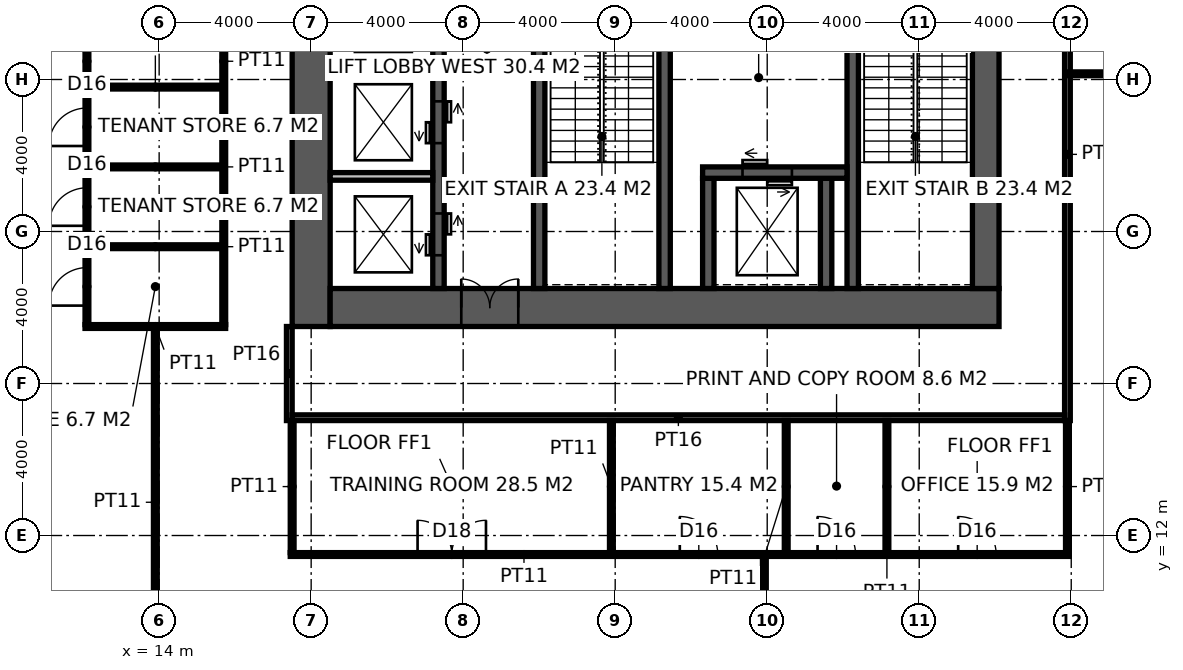
"""IFC4 building model, lengths in metres.
Left out: names, types, materials, properties, quantities, classifications, styles, units other than length and angle.
Written with IfcOpenShell. Run it as: python <this file> out.ifc"""

import sys

from ifc_helpers import new_model, si_unit, direction, frame, frame_2d, origin, place, context, subcontext, project, spatial, rectangle, extrude, element, fill, save


model = new_model("IFC4")
c1 = context("Model", 3, precision=1e-05, world=origin(), true_north=direction((0.0, 1.0)))
c2 = subcontext(c1, "Body", "Model", "MODEL_VIEW")
j1 = project(units=[si_unit("LENGTHUNIT", "METRE"), si_unit("PLANEANGLEUNIT", "RADIAN")], contexts=[c1])
p1 = place(None, origin())
s1 = spatial("IfcSite", under=j1, at=p1, CompositionType="ELEMENT")
p2 = place(p1, origin())
s2 = spatial("IfcBuilding", under=s1, at=p2, CompositionType="ELEMENT")
p3 = place(p2, frame((0.0, 0.0, 187.8)))
s3 = spatial("IfcBuildingStorey", under=s2, at=p3, CompositionType="ELEMENT", Elevation=187.8)
p4 = place(p3, frame((18.0, 17.5, -0.15), z_axis=(0.0, 0.0, 1.0), x_axis=(0.0, 1.0, 0.0)))
e1 = element("IfcWall", 1, at=p4, inside=s3, PredefinedType="SHEAR", context=c2, shape_type="SweptSolid", body=[
    extrude(rectangle(XDim=19.0, YDim=1.0, at=frame_2d((9.5, 0.0))), origin(), (0.0, 0.0, 1.0), 4.0),
])
p5 = place(p3, frame((18.5, 18.0, -0.15), z_axis=(0.0, 0.0, 1.0), x_axis=(1.0, 0.0, 0.0)))
e2 = element("IfcWall", 2, at=p5, inside=s3, PredefinedType="SHEAR", context=c2, shape_type="SweptSolid", body=[
    extrude(rectangle(XDim=17.6, YDim=1.0, at=frame_2d((8.8, 0.0))), origin(), (0.0, 0.0, 1.0), 4.0),
])
p6 = place(p5, frame((3.45, 0.0, 0.15)))
e3 = element("IfcOpeningElement", 3, at=p6, cuts=e2, PredefinedType="OPENING", context=c2, shape_type="SweptSolid", body=[
    extrude(rectangle(XDim=1.5, YDim=2.4, at=frame_2d((0.75, 1.2))), frame((0.0, 0.51, 0.0), z_axis=(0.0, -1.0, 0.0), x_axis=(1.0, 0.0, 0.0)), (0.0, 0.0, 1.0), 1.02),
])
p7 = place(p3, frame((35.75, 18.5, -0.15), z_axis=(0.0, 0.0, 1.0), x_axis=(0.0, 1.0, 0.0)))
e4 = element("IfcWall", 4, at=p7, inside=s3, PredefinedType="SHEAR", context=c2, shape_type="SweptSolid", body=[
    extrude(rectangle(XDim=17.0, YDim=0.7, at=frame_2d((8.5, 0.0))), origin(), (0.0, 0.0, 1.0), 4.0),
])
p8 = place(p7, frame((9.85, 0.0, 0.15)))
e5 = element("IfcOpeningElement", 5, at=p8, cuts=e4, PredefinedType="OPENING", context=c2, shape_type="SweptSolid", body=[
    extrude(rectangle(XDim=1.0, YDim=2.2, at=frame_2d((0.5, 1.1))), frame((0.0, 0.36, 0.0), z_axis=(0.0, -1.0, 0.0), x_axis=(1.0, 0.0, 0.0)), (0.0, 0.0, 1.0), 0.72),
])
p9 = place(p3, frame((24.0, 18.5, -0.15), z_axis=(0.0, 0.0, 1.0), x_axis=(0.0, 1.0, 0.0)))
e6 = element("IfcWall", 6, at=p9, inside=s3, PredefinedType="SHEAR", context=c2, shape_type="SweptSolid", body=[
    extrude(rectangle(XDim=17.0, YDim=0.3, at=frame_2d((8.5, 0.0))), origin(), (0.0, 0.0, 1.0), 4.0),
])
p10 = place(p9, frame((9.6, 0.0, 0.15)))
e7 = element("IfcOpeningElement", 7, at=p10, cuts=e6, PredefinedType="OPENING", context=c2, shape_type="SweptSolid", body=[
    extrude(rectangle(XDim=1.5, YDim=2.4, at=frame_2d((0.75, 1.2))), frame((0.0, 0.16, 0.0), z_axis=(0.0, -1.0, 0.0), x_axis=(1.0, 0.0, 0.0)), (0.0, 0.0, 1.0), 0.32),
])
p11 = place(p3, frame((27.3, 18.5, -0.15), z_axis=(0.0, 0.0, 1.0), x_axis=(0.0, 1.0, 0.0)))
e8 = element("IfcWall", 8, at=p11, inside=s3, PredefinedType="SHEAR", context=c2, shape_type="SweptSolid", body=[
    extrude(rectangle(XDim=7.9, YDim=0.3, at=frame_2d((3.95, 0.0))), origin(), (0.0, 0.0, 1.0), 4.0),
])
p12 = place(p11, frame((6.4, 0.0, 0.15)))
e9 = element("IfcOpeningElement", 9, at=p12, cuts=e8, PredefinedType="OPENING", context=c2, shape_type="SweptSolid", body=[
    extrude(rectangle(XDim=1.0, YDim=2.2, at=frame_2d((0.5, 1.1))), frame((0.0, 0.16, 0.0), z_axis=(0.0, -1.0, 0.0), x_axis=(1.0, 0.0, 0.0)), (0.0, 0.0, 1.0), 0.32),
])
p13 = place(p3, frame((32.25, 18.5, -0.15), z_axis=(0.0, 0.0, 1.0), x_axis=(0.0, 1.0, 0.0)))
e10 = element("IfcWall", 10, at=p13, inside=s3, PredefinedType="SHEAR", context=c2, shape_type="SweptSolid", body=[
    extrude(rectangle(XDim=7.9, YDim=0.3, at=frame_2d((3.95, 0.0))), origin(), (0.0, 0.0, 1.0), 4.0),
])
for number, where, z_axis, x_axis in (
    (11, (28.45, 18.5, -0.15), (0.0, 0.0, 1.0), (0.0, 1.0, 0.0)),
    (12, (31.55, 18.5, -0.15), (0.0, 0.0, 1.0), (0.0, 1.0, 0.0)),
):
    element("IfcWall", number, at=place(p3, frame(where, z_axis=z_axis, x_axis=x_axis)), inside=s3, PredefinedType="SHEAR", context=c2, shape_type="SweptSolid", body=[
        extrude(rectangle(XDim=2.9, YDim=0.3, at=frame_2d((1.45, 0.0))), origin(), (0.0, 0.0, 1.0), 4.0),
    ])
p14 = place(p3, frame((28.3, 21.55, -0.15), z_axis=(0.0, 0.0, 1.0), x_axis=(1.0, 0.0, 0.0)))
e13 = element("IfcWall", 13, at=p14, inside=s3, PredefinedType="SHEAR", context=c2, shape_type="SweptSolid", body=[
    extrude(rectangle(XDim=3.8, YDim=0.3, at=frame_2d((1.9, 0.0))), origin(), (0.0, 0.0, 1.0), 4.0),
])
p15 = place(p14, frame((1.05, 0.0, 0.15)))
e14 = element("IfcOpeningElement", 14, at=p15, cuts=e13, PredefinedType="OPENING", context=c2, shape_type="SweptSolid", body=[
    extrude(rectangle(XDim=1.3, YDim=2.4, at=frame_2d((0.65, 1.2))), frame((0.0, 0.16, 0.0), z_axis=(0.0, -1.0, 0.0), x_axis=(1.0, 0.0, 0.0)), (0.0, 0.0, 1.0), 0.32),
])
p16 = place(p3, frame((21.35, 18.5, -0.15), z_axis=(0.0, 0.0, 1.0), x_axis=(0.0, 1.0, 0.0)))
e15 = element("IfcWall", 15, at=p16, inside=s3, PredefinedType="SHEAR", context=c2, shape_type="SweptSolid", body=[
    extrude(rectangle(XDim=12.5, YDim=0.3, at=frame_2d((6.25, 0.0))), origin(), (0.0, 0.0, 1.0), 4.0),
])
p17 = place(p16, frame((0.875, 0.0, 0.15)))
e16 = element("IfcOpeningElement", 16, at=p17, cuts=e15, PredefinedType="OPENING", context=c2, shape_type="SweptSolid", body=[
    extrude(rectangle(XDim=1.1, YDim=2.2, at=frame_2d((0.55, 1.1))), frame((0.0, 0.16, 0.0), z_axis=(0.0, -1.0, 0.0), x_axis=(1.0, 0.0, 0.0)), (0.0, 0.0, 1.0), 0.32),
])
p18 = place(p16, frame((3.825, 0.0, 0.15)))
e17 = element("IfcOpeningElement", 17, at=p18, cuts=e15, PredefinedType="OPENING", context=c2, shape_type="SweptSolid", body=[
    extrude(rectangle(XDim=1.1, YDim=2.2, at=frame_2d((0.55, 1.1))), frame((0.0, 0.16, 0.0), z_axis=(0.0, -1.0, 0.0), x_axis=(1.0, 0.0, 0.0)), (0.0, 0.0, 1.0), 0.32),
])
p19 = place(p16, frame((6.675, 0.0, 0.15)))
e18 = element("IfcOpeningElement", 18, at=p19, cuts=e15, PredefinedType="OPENING", context=c2, shape_type="SweptSolid", body=[
    extrude(rectangle(XDim=1.1, YDim=2.2, at=frame_2d((0.55, 1.1))), frame((0.0, 0.16, 0.0), z_axis=(0.0, -1.0, 0.0), x_axis=(1.0, 0.0, 0.0)), (0.0, 0.0, 1.0), 0.32),
])
p20 = place(p16, frame((9.575, 0.0, 0.15)))
e19 = element("IfcOpeningElement", 19, at=p20, cuts=e15, PredefinedType="OPENING", context=c2, shape_type="SweptSolid", body=[
    extrude(rectangle(XDim=1.1, YDim=2.2, at=frame_2d((0.55, 1.1))), frame((0.0, 0.16, 0.0), z_axis=(0.0, -1.0, 0.0), x_axis=(1.0, 0.0, 0.0)), (0.0, 0.0, 1.0), 0.32),
])
for number, where, z_axis, x_axis in (
    (20, (18.5, 21.45, -0.15), (0.0, 0.0, 1.0), (1.0, 0.0, 0.0)),
    (21, (18.5, 24.3, -0.15), (0.0, 0.0, 1.0), (1.0, 0.0, 0.0)),
):
    element("IfcWall", number, at=place(p3, frame(where, z_axis=z_axis, x_axis=x_axis)), inside=s3, PredefinedType="SOLIDWALL", context=c2, shape_type="SweptSolid", body=[
        extrude(rectangle(XDim=2.7, YDim=0.2, at=frame_2d((1.35, 0.0))), origin(), (0.0, 0.0, 1.0), 4.0),
    ])
p21 = place(p3, frame((17.425, 15.025, 0.0), z_axis=(0.0, 0.0, 1.0), x_axis=(0.0, 1.0, 0.0)))
e22 = element("IfcWall", 22, at=p21, inside=s3, PredefinedType="PARTITIONING", context=c2, shape_type="SweptSolid", body=[
    extrude(rectangle(XDim=2.475, YDim=0.15, at=frame_2d((1.238, 0.0))), origin(), (0.0, 0.0, 1.0), 3.85),
])
p22 = place(p3, frame((37.9, 15.025, 0.0), z_axis=(0.0, 0.0, 1.0), x_axis=(0.0, 1.0, 0.0)))
e23 = element("IfcWall", 23, at=p22, inside=s3, PredefinedType="PARTITIONING", context=c2, shape_type="SweptSolid", body=[
    extrude(rectangle(XDim=23.35, YDim=0.15, at=frame_2d((11.675, 0.0))), origin(), (0.0, 0.0, 1.0), 2.95),
])
p23 = place(p22, frame((10.775, 0.0, 0.0)))
e24 = element("IfcOpeningElement", 24, at=p23, cuts=e23, PredefinedType="OPENING", context=c2, shape_type="SweptSolid", body=[
    extrude(rectangle(XDim=1.8, YDim=2.4, at=frame_2d((0.9, 1.2))), frame((0.0, 0.085, 0.0), z_axis=(0.0, -1.0, 0.0), x_axis=(1.0, 0.0, 0.0)), (0.0, 0.0, 1.0), 0.17),
])
p24 = place(p3, frame((17.5, 15.1, 0.0), z_axis=(0.0, 0.0, 1.0), x_axis=(1.0, 0.0, 0.0)))
e25 = element("IfcWall", 25, at=p24, inside=s3, PredefinedType="PARTITIONING", context=c2, shape_type="SweptSolid", body=[
    extrude(rectangle(XDim=20.325, YDim=0.15, at=frame_2d((10.163, 0.0))), origin(), (0.0, 0.0, 1.0), 3.85),
])
p25 = place(p3, frame((17.45, 11.5, 0.0), z_axis=(0.0, 0.0, 1.0), x_axis=(1.0, 0.0, 0.0)))
e26 = element("IfcWall", 26, at=p25, inside=s3, PredefinedType="PARTITIONING", context=c2, shape_type="SweptSolid", body=[
    extrude(rectangle(XDim=20.5, YDim=0.1, at=frame_2d((10.25, 0.0))), origin(), (0.0, 0.0, 1.0), 3.85),
])
p26 = place(p25, frame((3.35, 0.0, 0.0)))
e27 = element("IfcOpeningElement", 27, at=p26, cuts=e26, PredefinedType="OPENING", context=c2, shape_type="SweptSolid", body=[
    extrude(rectangle(XDim=1.8, YDim=2.4, at=frame_2d((0.9, 1.2))), frame((0.0, 0.06, 0.0), z_axis=(0.0, -1.0, 0.0), x_axis=(1.0, 0.0, 0.0)), (0.0, 0.0, 1.0), 0.12),
])
p27 = place(p25, frame((10.25, 0.0, 0.0)))
e28 = element("IfcOpeningElement", 28, at=p27, cuts=e26, PredefinedType="OPENING", context=c2, shape_type="SweptSolid", body=[
    extrude(rectangle(XDim=1.0, YDim=2.2, at=frame_2d((0.5, 1.1))), frame((0.0, 0.06, 0.0), z_axis=(0.0, -1.0, 0.0), x_axis=(1.0, 0.0, 0.0)), (0.0, 0.0, 1.0), 0.12),
])
p28 = place(p25, frame((13.875, 0.0, 0.0)))
e29 = element("IfcOpeningElement", 29, at=p28, cuts=e26, PredefinedType="OPENING", context=c2, shape_type="SweptSolid", body=[
    extrude(rectangle(XDim=1.0, YDim=2.2, at=frame_2d((0.5, 1.1))), frame((0.0, 0.06, 0.0), z_axis=(0.0, -1.0, 0.0), x_axis=(1.0, 0.0, 0.0)), (0.0, 0.0, 1.0), 0.12),
])
p29 = place(p25, frame((17.575, 0.0, 0.0)))
e30 = element("IfcOpeningElement", 30, at=p29, cuts=e26, PredefinedType="OPENING", context=c2, shape_type="SweptSolid", body=[
    extrude(rectangle(XDim=1.0, YDim=2.2, at=frame_2d((0.5, 1.1))), frame((0.0, 0.06, 0.0), z_axis=(0.0, -1.0, 0.0), x_axis=(1.0, 0.0, 0.0)), (0.0, 0.0, 1.0), 0.12),
])
p30 = place(p3, frame((12.05, 17.5, 0.0), z_axis=(0.0, 0.0, 1.0), x_axis=(1.0, 0.0, 0.0)))
e31 = element("IfcWall", 31, at=p30, inside=s3, PredefinedType="PARTITIONING", context=c2, shape_type="SweptSolid", body=[
    extrude(rectangle(XDim=3.7, YDim=0.1, at=frame_2d((1.85, 0.0))), origin(), (0.0, 0.0, 1.0), 3.85),
])
p31 = place(p3, frame((12.15, 19.6, 0.0), z_axis=(0.0, 0.0, 1.0), x_axis=(1.0, 0.0, 0.0)))
e32 = element("IfcWall", 32, at=p31, inside=s3, PredefinedType="PARTITIONING", context=c2, shape_type="SweptSolid", body=[
    extrude(rectangle(XDim=3.5, YDim=0.1, at=frame_2d((1.75, 0.0))), origin(), (0.0, 0.0, 1.0), 2.85),
])
p32 = place(p3, frame((12.15, 21.7, 0.0), z_axis=(0.0, 0.0, 1.0), x_axis=(1.0, 0.0, 0.0)))
e33 = element("IfcWall", 33, at=p32, inside=s3, PredefinedType="PARTITIONING", context=c2, shape_type="SweptSolid", body=[
    extrude(rectangle(XDim=3.5, YDim=0.1, at=frame_2d((1.75, 0.0))), origin(), (0.0, 0.0, 1.0), 3.85),
])
p33 = place(p3, frame((12.15, 23.8, 0.0), z_axis=(0.0, 0.0, 1.0), x_axis=(1.0, 0.0, 0.0)))
e34 = element("IfcWall", 34, at=p33, inside=s3, PredefinedType="PARTITIONING", context=c2, shape_type="SweptSolid", body=[
    extrude(rectangle(XDim=3.5, YDim=0.1, at=frame_2d((1.75, 0.0))), origin(), (0.0, 0.0, 1.0), 2.95),
])
p34 = place(p3, frame((12.1, 17.55, 0.0), z_axis=(0.0, 0.0, 1.0), x_axis=(0.0, 1.0, 0.0)))
e35 = element("IfcWall", 35, at=p34, inside=s3, PredefinedType="PARTITIONING", context=c2, shape_type="SweptSolid", body=[
    extrude(rectangle(XDim=9.9, YDim=0.1, at=frame_2d((4.95, 0.0))), origin(), (0.0, 0.0, 1.0), 3.85),
])
p35 = place(p34, frame((0.5, 0.0, 0.0)))
e36 = element("IfcOpeningElement", 36, at=p35, cuts=e35, PredefinedType="OPENING", context=c2, shape_type="SweptSolid", body=[
    extrude(rectangle(XDim=1.0, YDim=2.2, at=frame_2d((0.5, 1.1))), frame((0.0, 0.06, 0.0), z_axis=(0.0, -1.0, 0.0), x_axis=(1.0, 0.0, 0.0)), (0.0, 0.0, 1.0), 0.12),
])
p36 = place(p34, frame((2.6, 0.0, 0.0)))
e37 = element("IfcOpeningElement", 37, at=p36, cuts=e35, PredefinedType="OPENING", context=c2, shape_type="SweptSolid", body=[
    extrude(rectangle(XDim=1.0, YDim=2.2, at=frame_2d((0.5, 1.1))), frame((0.0, 0.06, 0.0), z_axis=(0.0, -1.0, 0.0), x_axis=(1.0, 0.0, 0.0)), (0.0, 0.0, 1.0), 0.12),
])
p37 = place(p34, frame((4.7, 0.0, 0.0)))
e38 = element("IfcOpeningElement", 38, at=p37, cuts=e35, PredefinedType="OPENING", context=c2, shape_type="SweptSolid", body=[
    extrude(rectangle(XDim=1.0, YDim=2.2, at=frame_2d((0.5, 1.1))), frame((0.0, 0.06, 0.0), z_axis=(0.0, -1.0, 0.0), x_axis=(1.0, 0.0, 0.0)), (0.0, 0.0, 1.0), 0.12),
])
p38 = place(p34, frame((7.6, 0.0, 0.0)))
e39 = element("IfcOpeningElement", 39, at=p38, cuts=e35, PredefinedType="OPENING", context=c2, shape_type="SweptSolid", body=[
    extrude(rectangle(XDim=1.0, YDim=2.2, at=frame_2d((0.5, 1.1))), frame((0.0, 0.06, 0.0), z_axis=(0.0, -1.0, 0.0), x_axis=(1.0, 0.0, 0.0)), (0.0, 0.0, 1.0), 0.12),
])
p39 = place(p3, frame((15.7, 17.55, 0.0), z_axis=(0.0, 0.0, 1.0), x_axis=(0.0, 1.0, 0.0)))
e40 = element("IfcWall", 40, at=p39, inside=s3, PredefinedType="PARTITIONING", context=c2, shape_type="SweptSolid", body=[
    extrude(rectangle(XDim=9.9, YDim=0.1, at=frame_2d((4.95, 0.0))), origin(), (0.0, 0.0, 1.0), 3.85),
])
p40 = place(p3, frame((17.5, 11.55, 0.0), z_axis=(0.0, 0.0, 1.0), x_axis=(0.0, 1.0, 0.0)))
e41 = element("IfcWall", 41, at=p40, inside=s3, PredefinedType="PARTITIONING", context=c2, shape_type="SweptSolid", body=[
    extrude(rectangle(XDim=3.475, YDim=0.1, at=frame_2d((1.737, 0.0))), origin(), (0.0, 0.0, 1.0), 3.85),
])
p41 = place(p3, frame((25.9, 11.55, 0.0), z_axis=(0.0, 0.0, 1.0), x_axis=(0.0, 1.0, 0.0)))
e42 = element("IfcWall", 42, at=p41, inside=s3, PredefinedType="PARTITIONING", context=c2, shape_type="SweptSolid", body=[
    extrude(rectangle(XDim=3.475, YDim=0.1, at=frame_2d((1.737, 0.0))), origin(), (0.0, 0.0, 1.0), 2.95),
])
for number, where, z_axis, x_axis in (
    (43, (30.5, 11.55, 0.0), (0.0, 0.0, 1.0), (0.0, 1.0, 0.0)),
    (44, (33.15, 11.55, 0.0), (0.0, 0.0, 1.0), (0.0, 1.0, 0.0)),
):
    element("IfcWall", number, at=place(p3, frame(where, z_axis=z_axis, x_axis=x_axis)), inside=s3, PredefinedType="PARTITIONING", context=c2, shape_type="SweptSolid", body=[
        extrude(rectangle(XDim=3.475, YDim=0.1, at=frame_2d((1.737, 0.0))), origin(), (0.0, 0.0, 1.0), 3.85),
    ])
p42 = place(p3, frame((37.9, 11.55, 0.0), z_axis=(0.0, 0.0, 1.0), x_axis=(0.0, 1.0, 0.0)))
e45 = element("IfcWall", 45, at=p42, inside=s3, PredefinedType="PARTITIONING", context=c2, shape_type="SweptSolid", body=[
    extrude(rectangle(XDim=3.475, YDim=0.1, at=frame_2d((1.737, 0.0))), origin(), (0.0, 0.0, 1.0), 2.95),
])
p43 = place(p3, frame((29.925, 11.45, 0.0), z_axis=(0.0, 0.0, 1.0), x_axis=(0.0, -1.0, 0.0)))
e46 = element("IfcWall", 46, at=p43, inside=s3, PredefinedType="PARTITIONING", context=c2, shape_type="SweptSolid", body=[
    extrude(rectangle(XDim=3.15, YDim=0.1, at=frame_2d((1.575, 0.0))), origin(), (0.0, 0.0, 1.0), 2.95),
])
p44 = place(p3, frame((13.9, 8.3, 0.0), z_axis=(0.0, 0.0, 1.0), x_axis=(0.0, 1.0, 0.0)))
e47 = element("IfcWall", 47, at=p44, inside=s3, PredefinedType="PARTITIONING", context=c2, shape_type="SweptSolid", body=[
    extrude(rectangle(XDim=9.15, YDim=0.1, at=frame_2d((4.575, 0.0))), origin(), (0.0, 0.0, 1.0), 2.95),
])
p45 = place(p3, frame((37.9, 24.15, 0.0), z_axis=(0.0, 0.0, 1.0), x_axis=(1.0, 0.0, 0.0)))
e48 = element("IfcWall", 48, at=p45, inside=s3, PredefinedType="PARTITIONING", context=c2, shape_type="SweptSolid", body=[
    extrude(rectangle(XDim=4.5, YDim=0.1, at=frame_2d((2.25, 0.0))), origin(), (0.0, 0.0, 1.0), 2.95),
])
p46 = place(p6, origin())
e49 = element("IfcDoor", 49, at=p46, inside=s3, OperationType="DOUBLE_DOOR_DOUBLE_SWING", PredefinedType="DOOR", context=c2, shape_type="SweptSolid", body=[
    extrude(rectangle(XDim=1.5, YDim=2.4, at=frame_2d((0.75, 1.2))), frame((0.0, 0.025, 0.0), z_axis=(0.0, -1.0, 0.0), x_axis=(1.0, 0.0, 0.0)), (0.0, 0.0, 1.0), 0.05),
])
fill(e3, e49)
p47 = place(p26, origin())
e50 = element("IfcDoor", 50, at=p47, inside=s3, OperationType="DOUBLE_DOOR_DOUBLE_SWING", PredefinedType="DOOR", context=c2, shape_type="SweptSolid", body=[
    extrude(rectangle(XDim=1.8, YDim=2.4, at=frame_2d((0.9, 1.2))), frame((0.0, 0.025, 0.0), z_axis=(0.0, -1.0, 0.0), x_axis=(1.0, 0.0, 0.0)), (0.0, 0.0, 1.0), 0.05),
])
fill(e27, e50)
p48 = place(p27, origin())
e51 = element("IfcDoor", 51, at=p48, inside=s3, OperationType="SINGLE_SWING_LEFT", PredefinedType="DOOR", context=c2, shape_type="SweptSolid", body=[
    extrude(rectangle(XDim=1.0, YDim=2.2, at=frame_2d((0.5, 1.1))), frame((0.0, 0.025, 0.0), z_axis=(0.0, -1.0, 0.0), x_axis=(1.0, 0.0, 0.0)), (0.0, 0.0, 1.0), 0.05),
])
fill(e28, e51)
p49 = place(p28, origin())
e52 = element("IfcDoor", 52, at=p49, inside=s3, OperationType="SINGLE_SWING_LEFT", PredefinedType="DOOR", context=c2, shape_type="SweptSolid", body=[
    extrude(rectangle(XDim=1.0, YDim=2.2, at=frame_2d((0.5, 1.1))), frame((0.0, 0.025, 0.0), z_axis=(0.0, -1.0, 0.0), x_axis=(1.0, 0.0, 0.0)), (0.0, 0.0, 1.0), 0.05),
])
fill(e29, e52)
p50 = place(p29, origin())
e53 = element("IfcDoor", 53, at=p50, inside=s3, OperationType="SINGLE_SWING_LEFT", PredefinedType="DOOR", context=c2, shape_type="SweptSolid", body=[
    extrude(rectangle(XDim=1.0, YDim=2.2, at=frame_2d((0.5, 1.1))), frame((0.0, 0.025, 0.0), z_axis=(0.0, -1.0, 0.0), x_axis=(1.0, 0.0, 0.0)), (0.0, 0.0, 1.0), 0.05),
])
fill(e30, e53)
p51 = place(p35, origin())
e54 = element("IfcDoor", 54, at=p51, inside=s3, OperationType="SINGLE_SWING_LEFT", PredefinedType="DOOR", context=c2, shape_type="SweptSolid", body=[
    extrude(rectangle(XDim=1.0, YDim=2.2, at=frame_2d((0.5, 1.1))), frame((0.0, 0.025, 0.0), z_axis=(0.0, -1.0, 0.0), x_axis=(1.0, 0.0, 0.0)), (0.0, 0.0, 1.0), 0.05),
])
fill(e36, e54)
p52 = place(p36, origin())
e55 = element("IfcDoor", 55, at=p52, inside=s3, OperationType="SINGLE_SWING_LEFT", PredefinedType="DOOR", context=c2, shape_type="SweptSolid", body=[
    extrude(rectangle(XDim=1.0, YDim=2.2, at=frame_2d((0.5, 1.1))), frame((0.0, 0.025, 0.0), z_axis=(0.0, -1.0, 0.0), x_axis=(1.0, 0.0, 0.0)), (0.0, 0.0, 1.0), 0.05),
])
fill(e37, e55)
p53 = place(p37, origin())
e56 = element("IfcDoor", 56, at=p53, inside=s3, OperationType="SINGLE_SWING_LEFT", PredefinedType="DOOR", context=c2, shape_type="SweptSolid", body=[
    extrude(rectangle(XDim=1.0, YDim=2.2, at=frame_2d((0.5, 1.1))), frame((0.0, 0.025, 0.0), z_axis=(0.0, -1.0, 0.0), x_axis=(1.0, 0.0, 0.0)), (0.0, 0.0, 1.0), 0.05),
])
fill(e38, e56)
p54 = place(p15, origin())
e57 = element("IfcDoor", 57, at=p54, inside=s3, OperationType="DOUBLE_DOOR_SLIDING", PredefinedType="DOOR", context=c2, shape_type="SweptSolid", body=[
    extrude(rectangle(XDim=1.3, YDim=2.4, at=frame_2d((0.65, 1.2))), frame((0.0, 0.025, 0.0), z_axis=(0.0, -1.0, 0.0), x_axis=(1.0, 0.0, 0.0)), (0.0, 0.0, 1.0), 0.05),
])
fill(e14, e57)
p55 = place(p17, origin())
e58 = element("IfcDoor", 58, at=p55, inside=s3, OperationType="DOUBLE_DOOR_SLIDING", PredefinedType="DOOR", context=c2, shape_type="SweptSolid", body=[
    extrude(rectangle(XDim=1.1, YDim=2.2, at=frame_2d((0.55, 1.1))), frame((0.0, 0.025, 0.0), z_axis=(0.0, -1.0, 0.0), x_axis=(1.0, 0.0, 0.0)), (0.0, 0.0, 1.0), 0.05),
])
fill(e16, e58)
p56 = place(p18, origin())
e59 = element("IfcDoor", 59, at=p56, inside=s3, OperationType="DOUBLE_DOOR_SLIDING", PredefinedType="DOOR", context=c2, shape_type="SweptSolid", body=[
    extrude(rectangle(XDim=1.1, YDim=2.2, at=frame_2d((0.55, 1.1))), frame((0.0, 0.025, 0.0), z_axis=(0.0, -1.0, 0.0), x_axis=(1.0, 0.0, 0.0)), (0.0, 0.0, 1.0), 0.05),
])
fill(e17, e59)
save(model, sys.argv[1])
